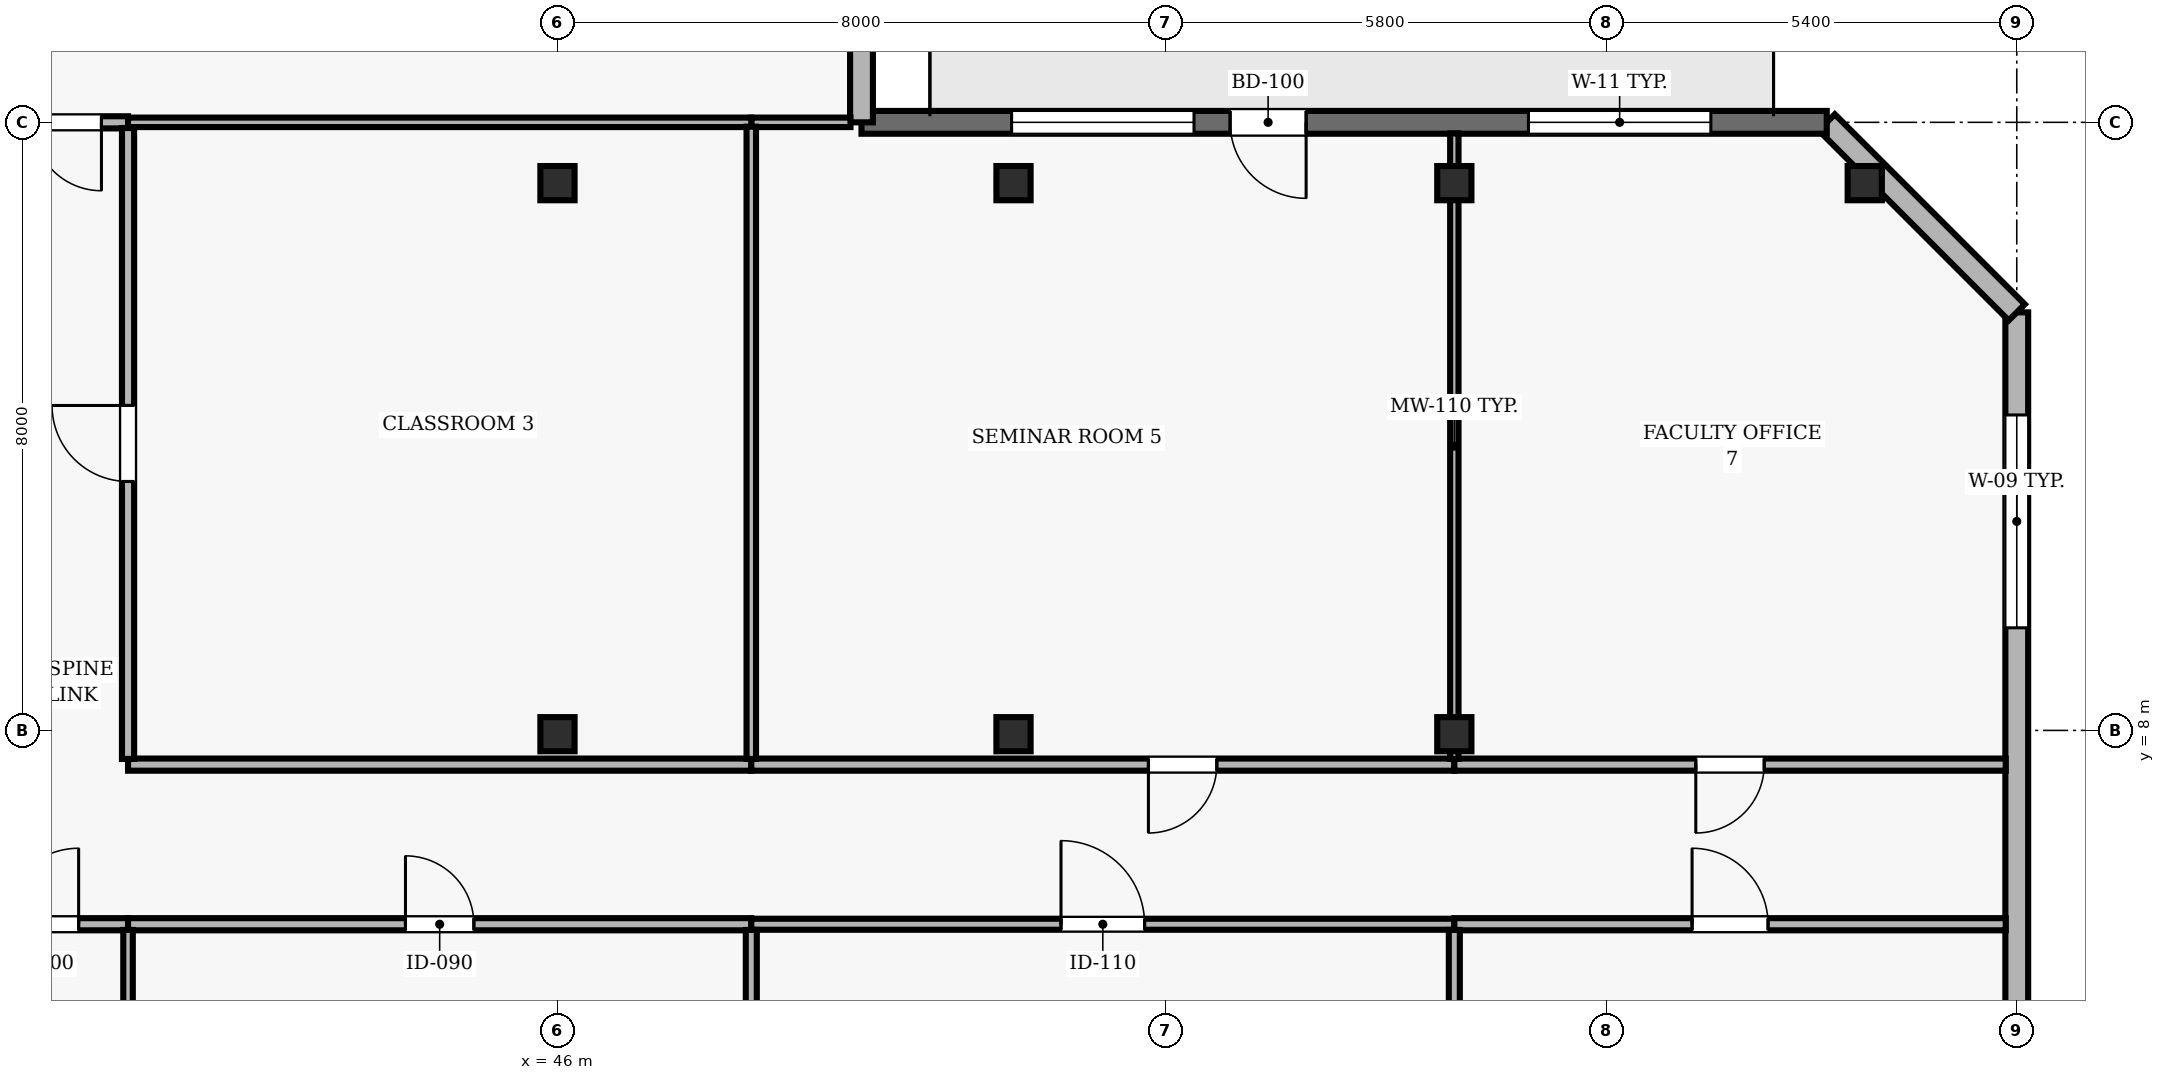
"""IFC4 building model, lengths in metres.
Left out: names, types, materials, properties, quantities, classifications, styles, units other than length and angle.
Written with IfcOpenShell. Run it as: python <this file> out.ifc"""

import sys

from ifc_helpers import new_model, si_unit, direction, frame, frame_2d, origin, origin_2d, place, context, subcontext, project, spatial, rectangle, hollow_rectangle, extrude, element, fill, save


model = new_model("IFC4")
c1 = context("Model", 3, precision=1e-05, world=origin(), true_north=direction((0.0, 1.0)))
c2 = subcontext(c1, "Body", "Model", "MODEL_VIEW")
j1 = project(units=[si_unit("LENGTHUNIT", "METRE"), si_unit("PLANEANGLEUNIT", "RADIAN")], contexts=[c1])
p1 = place(None, origin())
s1 = spatial("IfcSite", under=j1, at=p1, CompositionType="ELEMENT")
p2 = place(p1, origin())
s2 = spatial("IfcBuilding", under=s1, at=p2, CompositionType="ELEMENT")
p3 = place(p2, frame((0.0, 0.0, 175.8)))
s3 = spatial("IfcBuildingStorey", under=s2, at=p3, CompositionType="ELEMENT", Elevation=175.8)
for number, where, z_axis, x_axis in (
    (1, (46.0, 7.95, 0.0), (0.0, 0.0, 1.0), (1.0, 0.0, 0.0)),
    (2, (46.0, 15.2, 0.0), (0.0, 0.0, 1.0), (1.0, 0.0, 0.0)),
    (3, (52.0, 7.95, 0.0), (0.0, 0.0, 1.0), (1.0, 0.0, 0.0)),
    (4, (52.0, 15.2, 0.0), (0.0, 0.0, 1.0), (1.0, 0.0, 0.0)),
    (5, (57.8, 7.95, 0.0), (0.0, 0.0, 1.0), (1.0, 0.0, 0.0)),
    (6, (57.8, 15.2, 0.0), (0.0, 0.0, 1.0), (1.0, 0.0, 0.0)),
    (7, (63.2, 15.2, 0.0), (0.0, 0.0, 1.0), (1.0, 0.0, 0.0)),
):
    element("IfcColumn", number, at=place(p3, frame(where, z_axis=z_axis, x_axis=x_axis)), inside=s3, PredefinedType="COLUMN", context=c2, shape_type="SweptSolid", body=[
        extrude(hollow_rectangle(XDim=0.45, YDim=0.45, WallThickness=0.02, at=origin_2d()), origin(), (0.0, 0.0, 1.0), 3.9),
    ])
p4 = place(p3, frame((65.2, 2.5, 0.0), z_axis=(0.0, 0.0, 1.0), x_axis=(0.0, 1.0, 0.0)))
e8 = element("IfcWall", 8, at=p4, inside=s3, PredefinedType="SOLIDWALL", context=c2, shape_type="SweptSolid", body=[
    extrude(rectangle(XDim=11.0, YDim=0.3, at=frame_2d((5.5, 0.0))), origin(), (0.0, 0.0, 1.0), 3.69),
])
p5 = place(p4, frame((6.85, 0.0, 0.9)))
e9 = element("IfcOpeningElement", 9, at=p5, cuts=e8, PredefinedType="OPENING", context=c2, shape_type="SweptSolid", body=[
    extrude(rectangle(XDim=2.8, YDim=1.8, at=frame_2d((1.4, 0.9))), frame((0.0, 0.16, 0.0), z_axis=(0.0, -1.0, 0.0), x_axis=(1.0, 0.0, 0.0)), (0.0, 0.0, 1.0), 0.32),
])
p6 = place(p3, frame((65.2, 13.5, 0.0), z_axis=(0.0, 0.0, 1.0), x_axis=(-0.707106781187, 0.707106781187, 0.0)))
e10 = element("IfcWall", 10, at=p6, inside=s3, PredefinedType="SOLIDWALL", context=c2, shape_type="SweptSolid", body=[
    extrude(rectangle(XDim=3.536, YDim=0.3, at=frame_2d((1.768, 0.0))), origin(), (0.0, 0.0, 1.0), 3.69),
])
p7 = place(p3, frame((62.7, 16.0, 0.0), z_axis=(0.0, 0.0, 1.0), x_axis=(-1.0, 0.0, 0.0)))
e11 = element("IfcWall", 11, at=p7, inside=s3, PredefinedType="SOLIDWALL", context=c2, shape_type="SweptSolid", body=[
    extrude(rectangle(XDim=12.7, YDim=0.3, at=frame_2d((6.35, 0.0))), origin(), (0.0, 0.0, 1.0), 3.69),
])
p8 = place(p7, frame((6.85, 0.0, 0.0)))
e12 = element("IfcOpeningElement", 12, at=p8, cuts=e11, PredefinedType="OPENING", context=c2, shape_type="SweptSolid", body=[
    extrude(rectangle(XDim=1.0, YDim=2.2, at=frame_2d((0.5, 1.1))), frame((0.0, 0.16, 0.0), z_axis=(0.0, -1.0, 0.0), x_axis=(1.0, 0.0, 0.0)), (0.0, 0.0, 1.0), 0.32),
])
p9 = place(p7, frame((1.525, 0.0, 0.9)))
e13 = element("IfcOpeningElement", 13, at=p9, cuts=e11, PredefinedType="OPENING", context=c2, shape_type="SweptSolid", body=[
    extrude(rectangle(XDim=2.4, YDim=2.2, at=frame_2d((1.2, 1.1))), frame((0.0, 0.16, 0.0), z_axis=(0.0, -1.0, 0.0), x_axis=(1.0, 0.0, 0.0)), (0.0, 0.0, 1.0), 0.32),
])
p10 = place(p7, frame((8.325, 0.0, 0.9)))
e14 = element("IfcOpeningElement", 14, at=p10, cuts=e11, PredefinedType="OPENING", context=c2, shape_type="SweptSolid", body=[
    extrude(rectangle(XDim=2.4, YDim=2.2, at=frame_2d((1.2, 1.1))), frame((0.0, 0.16, 0.0), z_axis=(0.0, -1.0, 0.0), x_axis=(1.0, 0.0, 0.0)), (0.0, 0.0, 1.0), 0.32),
])
p11 = place(p3, frame((50.0, 16.0, 0.0), z_axis=(0.0, 0.0, 1.0), x_axis=(0.0, 1.0, 0.0)))
e15 = element("IfcWall", 15, at=p11, inside=s3, PredefinedType="SOLIDWALL", context=c2, shape_type="SweptSolid", body=[
    extrude(rectangle(XDim=7.44, YDim=0.3, at=frame_2d((3.72, 0.0))), origin(), (0.0, 0.0, 1.0), 3.69),
])
p12 = place(p11, frame((2.22, 0.0, 0.9)))
e16 = element("IfcOpeningElement", 16, at=p12, cuts=e15, PredefinedType="OPENING", context=c2, shape_type="SweptSolid", body=[
    extrude(rectangle(XDim=3.0, YDim=2.2, at=frame_2d((1.5, 1.1))), frame((0.0, 0.16, 0.0), z_axis=(0.0, -1.0, 0.0), x_axis=(1.0, 0.0, 0.0)), (0.0, 0.0, 1.0), 0.32),
])
p13 = place(p3, frame((38.05, 5.45, 0.0), z_axis=(0.0, 0.0, 1.0), x_axis=(1.0, 0.0, 0.0)))
e17 = element("IfcWall", 17, at=p13, inside=s3, PredefinedType="PARTITIONING", context=c2, shape_type="SweptSolid", body=[
    extrude(rectangle(XDim=2.3, YDim=0.16, at=frame_2d((1.15, 0.0))), origin(), (0.0, 0.0, 1.0), 3.343),
])
p14 = place(p13, frame((0.65, 0.0, 0.0)))
e18 = element("IfcOpeningElement", 18, at=p14, cuts=e17, PredefinedType="OPENING", context=c2, shape_type="SweptSolid", body=[
    extrude(rectangle(XDim=1.0, YDim=2.1, at=frame_2d((0.5, 1.05))), frame((0.0, 0.09, 0.0), z_axis=(0.0, -1.0, 0.0), x_axis=(1.0, 0.0, 0.0)), (0.0, 0.0, 1.0), 0.18),
])
p15 = place(p3, frame((40.35, 5.45, 0.0), z_axis=(0.0, 0.0, 1.0), x_axis=(1.0, 0.0, 0.0)))
e19 = element("IfcWall", 19, at=p15, inside=s3, PredefinedType="PARTITIONING", context=c2, shape_type="SweptSolid", body=[
    extrude(rectangle(XDim=8.2, YDim=0.16, at=frame_2d((4.1, 0.0))), origin(), (0.0, 0.0, 1.0), 3.343),
])
p16 = place(p15, frame((3.65, 0.0, 0.0)))
e20 = element("IfcOpeningElement", 20, at=p16, cuts=e19, PredefinedType="OPENING", context=c2, shape_type="SweptSolid", body=[
    extrude(rectangle(XDim=0.9, YDim=2.1, at=frame_2d((0.45, 1.05))), frame((0.0, 0.09, 0.0), z_axis=(0.0, -1.0, 0.0), x_axis=(1.0, 0.0, 0.0)), (0.0, 0.0, 1.0), 0.18),
])
p17 = place(p3, frame((40.35, 16.0, 0.0), z_axis=(0.0, 0.0, 1.0), x_axis=(-1.0, 0.0, 0.0)))
e21 = element("IfcWall", 21, at=p17, inside=s3, PredefinedType="PARTITIONING", context=c2, shape_type="SweptSolid", body=[
    extrude(rectangle(XDim=2.3, YDim=0.16, at=frame_2d((1.15, 0.0))), origin(), (0.0, 0.0, 1.0), 3.69),
])
p18 = place(p17, frame((0.35, 0.0, 0.0)))
e22 = element("IfcOpeningElement", 22, at=p18, cuts=e21, PredefinedType="OPENING", context=c2, shape_type="SweptSolid", body=[
    extrude(rectangle(XDim=0.9, YDim=2.1, at=frame_2d((0.45, 1.05))), frame((0.0, 0.09, 0.0), z_axis=(0.0, -1.0, 0.0), x_axis=(1.0, 0.0, 0.0)), (0.0, 0.0, 1.0), 0.18),
])
p19 = place(p3, frame((48.55, 5.45, 0.0), z_axis=(0.0, 0.0, 1.0), x_axis=(1.0, 0.0, 0.0)))
e23 = element("IfcWall", 23, at=p19, inside=s3, PredefinedType="PARTITIONING", context=c2, shape_type="SweptSolid", body=[
    extrude(rectangle(XDim=9.25, YDim=0.145, at=frame_2d((4.625, 0.0))), origin(), (0.0, 0.0, 1.0), 3.343),
])
p20 = place(p19, frame((4.075, 0.0, 0.0)))
e24 = element("IfcOpeningElement", 24, at=p20, cuts=e23, PredefinedType="OPENING", context=c2, shape_type="SweptSolid", body=[
    extrude(rectangle(XDim=1.1, YDim=2.15, at=frame_2d((0.55, 1.075))), frame((0.0, 0.083, 0.0), z_axis=(0.0, -1.0, 0.0), x_axis=(1.0, 0.0, 0.0)), (0.0, 0.0, 1.0), 0.165),
])
p21 = place(p3, frame((48.55, 7.55, 0.0), z_axis=(0.0, 0.0, 1.0), x_axis=(-1.0, 0.0, 0.0)))
e25 = element("IfcWall", 25, at=p21, inside=s3, PredefinedType="PARTITIONING", context=c2, shape_type="SweptSolid", body=[
    extrude(rectangle(XDim=8.2, YDim=0.16, at=frame_2d((4.1, 0.0))), origin(), (0.0, 0.0, 1.0), 3.139),
])
p22 = place(p3, frame((48.55, 16.0, 0.0), z_axis=(0.0, 0.0, 1.0), x_axis=(1.0, 0.0, 0.0)))
e26 = element("IfcWall", 26, at=p22, inside=s3, PredefinedType="PARTITIONING", context=c2, shape_type="SweptSolid", body=[
    extrude(rectangle(XDim=1.305, YDim=0.125, at=frame_2d((0.652, 0.0))), origin(), (0.0, 0.0, 1.0), 3.69),
])
p23 = place(p3, frame((48.55, 16.0, 0.0), z_axis=(0.0, 0.0, 1.0), x_axis=(-1.0, 0.0, 0.0)))
e27 = element("IfcWall", 27, at=p23, inside=s3, PredefinedType="PARTITIONING", context=c2, shape_type="SweptSolid", body=[
    extrude(rectangle(XDim=8.2, YDim=0.125, at=frame_2d((4.1, 0.0))), origin(), (0.0, 0.0, 1.0), 3.69),
])
p24 = place(p3, frame((57.8, 5.45, 0.0), z_axis=(0.0, 0.0, 1.0), x_axis=(1.0, 0.0, 0.0)))
e28 = element("IfcWall", 28, at=p24, inside=s3, PredefinedType="PARTITIONING", context=c2, shape_type="SweptSolid", body=[
    extrude(rectangle(XDim=7.255, YDim=0.16, at=frame_2d((3.627, 0.0))), origin(), (0.0, 0.0, 1.0), 3.69),
])
p25 = place(p24, frame((3.128, 0.0, 0.0)))
e29 = element("IfcOpeningElement", 29, at=p25, cuts=e28, PredefinedType="OPENING", context=c2, shape_type="SweptSolid", body=[
    extrude(rectangle(XDim=1.0, YDim=2.1, at=frame_2d((0.5, 1.05))), frame((0.0, 0.09, 0.0), z_axis=(0.0, -1.0, 0.0), x_axis=(1.0, 0.0, 0.0)), (0.0, 0.0, 1.0), 0.18),
])
p26 = place(p3, frame((57.8, 7.55, 0.0), z_axis=(0.0, 0.0, 1.0), x_axis=(-1.0, 0.0, 0.0)))
e30 = element("IfcWall", 30, at=p26, inside=s3, PredefinedType="PARTITIONING", context=c2, shape_type="SweptSolid", body=[
    extrude(rectangle(XDim=9.25, YDim=0.16, at=frame_2d((4.625, 0.0))), origin(), (0.0, 0.0, 1.0), 3.139),
])
p27 = place(p26, frame((3.125, 0.0, 0.0)))
e31 = element("IfcOpeningElement", 31, at=p27, cuts=e30, PredefinedType="OPENING", context=c2, shape_type="SweptSolid", body=[
    extrude(rectangle(XDim=0.9, YDim=2.1, at=frame_2d((0.45, 1.05))), frame((0.0, 0.09, 0.0), z_axis=(0.0, -1.0, 0.0), x_axis=(1.0, 0.0, 0.0)), (0.0, 0.0, 1.0), 0.18),
])
p28 = place(p3, frame((65.055, 7.55, 0.0), z_axis=(0.0, 0.0, 1.0), x_axis=(-1.0, 0.0, 0.0)))
e32 = element("IfcWall", 32, at=p28, inside=s3, PredefinedType="PARTITIONING", context=c2, shape_type="SweptSolid", body=[
    extrude(rectangle(XDim=7.255, YDim=0.16, at=frame_2d((3.627, 0.0))), origin(), (0.0, 0.0, 1.0), 3.69),
])
p29 = place(p28, frame((3.178, 0.0, 0.0)))
e33 = element("IfcOpeningElement", 33, at=p29, cuts=e32, PredefinedType="OPENING", context=c2, shape_type="SweptSolid", body=[
    extrude(rectangle(XDim=0.9, YDim=2.1, at=frame_2d((0.45, 1.05))), frame((0.0, 0.09, 0.0), z_axis=(0.0, -1.0, 0.0), x_axis=(1.0, 0.0, 0.0)), (0.0, 0.0, 1.0), 0.18),
])
p30 = place(p3, frame((40.35, 0.145, 0.0), z_axis=(0.0, 0.0, 1.0), x_axis=(0.0, 1.0, 0.0)))
e34 = element("IfcWall", 34, at=p30, inside=s3, PredefinedType="PARTITIONING", context=c2, shape_type="SweptSolid", body=[
    extrude(rectangle(XDim=5.23, YDim=0.125, at=frame_2d((2.615, 0.0))), origin(), (0.0, 0.0, 1.0), 3.69),
])
p31 = place(p3, frame((40.35, 7.625, 0.0), z_axis=(0.0, 0.0, 1.0), x_axis=(0.0, 1.0, 0.0)))
e35 = element("IfcWall", 35, at=p31, inside=s3, PredefinedType="PARTITIONING", context=c2, shape_type="SweptSolid", body=[
    extrude(rectangle(XDim=8.3, YDim=0.16, at=frame_2d((4.15, 0.0))), origin(), (0.0, 0.0, 1.0), 3.343),
])
p32 = place(p31, frame((3.65, 0.0, 0.0)))
e36 = element("IfcOpeningElement", 36, at=p32, cuts=e35, PredefinedType="OPENING", context=c2, shape_type="SweptSolid", body=[
    extrude(rectangle(XDim=1.0, YDim=2.1, at=frame_2d((0.5, 1.05))), frame((0.0, 0.09, 0.0), z_axis=(0.0, -1.0, 0.0), x_axis=(1.0, 0.0, 0.0)), (0.0, 0.0, 1.0), 0.18),
])
p33 = place(p3, frame((48.55, 0.145, 0.0), z_axis=(0.0, 0.0, 1.0), x_axis=(0.0, 1.0, 0.0)))
e37 = element("IfcWall", 37, at=p33, inside=s3, PredefinedType="PARTITIONING", context=c2, shape_type="SweptSolid", body=[
    extrude(rectangle(XDim=5.23, YDim=0.145, at=frame_2d((2.615, 0.0))), origin(), (0.0, 0.0, 1.0), 3.69),
])
p34 = place(p3, frame((48.55, 7.625, 0.0), z_axis=(0.0, 0.0, 1.0), x_axis=(0.0, 1.0, 0.0)))
e38 = element("IfcWall", 38, at=p34, inside=s3, PredefinedType="PARTITIONING", context=c2, shape_type="SweptSolid", body=[
    extrude(rectangle(XDim=8.318, YDim=0.125, at=frame_2d((4.159, 0.0))), origin(), (0.0, 0.0, 1.0), 3.69),
])
p35 = place(p3, frame((57.8, 0.145, 0.0), z_axis=(0.0, 0.0, 1.0), x_axis=(0.0, 1.0, 0.0)))
e39 = element("IfcWall", 39, at=p35, inside=s3, PredefinedType="PARTITIONING", context=c2, shape_type="SweptSolid", body=[
    extrude(rectangle(XDim=5.23, YDim=0.145, at=frame_2d((2.615, 0.0))), origin(), (0.0, 0.0, 1.0), 3.139),
])
p36 = place(p3, frame((57.8, 7.625, 0.0), z_axis=(0.0, 0.0, 1.0), x_axis=(0.0, 1.0, 0.0)))
e40 = element("IfcWall", 40, at=p36, inside=s3, PredefinedType="MOVABLE", context=c2, shape_type="SweptSolid", body=[
    extrude(rectangle(XDim=8.23, YDim=0.11, at=frame_2d((4.115, 0.0))), origin(), (0.0, 0.0, 1.0), 3.139),
])
p37 = place(p5, origin())
e41 = element("IfcWindow", 41, at=p37, inside=s3, PartitioningType="SINGLE_PANEL", PredefinedType="WINDOW", context=c2, shape_type="SweptSolid", body=[
    extrude(rectangle(XDim=2.8, YDim=1.8, at=frame_2d((1.4, 0.9))), frame((0.0, 0.03, 0.0), z_axis=(0.0, -1.0, 0.0), x_axis=(1.0, 0.0, 0.0)), (0.0, 0.0, 1.0), 0.06),
])
fill(e9, e41)
p38 = place(p8, origin())
e42 = element("IfcDoor", 42, at=p38, inside=s3, OperationType="SINGLE_SWING_LEFT", PredefinedType="DOOR", context=c2, shape_type="SweptSolid", body=[
    extrude(rectangle(XDim=1.0, YDim=2.2, at=frame_2d((0.5, 1.1))), frame((0.0, 0.025, 0.0), z_axis=(0.0, -1.0, 0.0), x_axis=(1.0, 0.0, 0.0)), (0.0, 0.0, 1.0), 0.05),
])
fill(e12, e42)
p39 = place(p9, origin())
e43 = element("IfcWindow", 43, at=p39, inside=s3, PartitioningType="SINGLE_PANEL", PredefinedType="WINDOW", context=c2, shape_type="SweptSolid", body=[
    extrude(rectangle(XDim=2.4, YDim=2.2, at=frame_2d((1.2, 1.1))), frame((0.0, 0.03, 0.0), z_axis=(0.0, -1.0, 0.0), x_axis=(1.0, 0.0, 0.0)), (0.0, 0.0, 1.0), 0.06),
])
fill(e13, e43)
p40 = place(p10, origin())
e44 = element("IfcWindow", 44, at=p40, inside=s3, PartitioningType="SINGLE_PANEL", PredefinedType="WINDOW", context=c2, shape_type="SweptSolid", body=[
    extrude(rectangle(XDim=2.4, YDim=2.2, at=frame_2d((1.2, 1.1))), frame((0.0, 0.03, 0.0), z_axis=(0.0, -1.0, 0.0), x_axis=(1.0, 0.0, 0.0)), (0.0, 0.0, 1.0), 0.06),
])
fill(e14, e44)
p41 = place(p14, origin())
e45 = element("IfcDoor", 45, at=p41, inside=s3, OperationType="SINGLE_SWING_RIGHT", PredefinedType="DOOR", context=c2, shape_type="SweptSolid", body=[
    extrude(rectangle(XDim=1.0, YDim=2.1, at=frame_2d((0.5, 1.05))), frame((0.0, 0.025, 0.0), z_axis=(0.0, -1.0, 0.0), x_axis=(1.0, 0.0, 0.0)), (0.0, 0.0, 1.0), 0.05),
])
fill(e18, e45)
p42 = place(p16, origin())
e46 = element("IfcDoor", 46, at=p42, inside=s3, OperationType="SINGLE_SWING_LEFT", PredefinedType="DOOR", context=c2, shape_type="SweptSolid", body=[
    extrude(rectangle(XDim=0.9, YDim=2.1, at=frame_2d((0.45, 1.05))), frame((0.0, 0.025, 0.0), z_axis=(0.0, -1.0, 0.0), x_axis=(1.0, 0.0, 0.0)), (0.0, 0.0, 1.0), 0.05),
])
fill(e20, e46)
p43 = place(p32, origin())
e47 = element("IfcDoor", 47, at=p43, inside=s3, OperationType="SINGLE_SWING_RIGHT", PredefinedType="DOOR", context=c2, shape_type="SweptSolid", body=[
    extrude(rectangle(XDim=1.0, YDim=2.1, at=frame_2d((0.5, 1.05))), frame((0.0, 0.025, 0.0), z_axis=(0.0, -1.0, 0.0), x_axis=(1.0, 0.0, 0.0)), (0.0, 0.0, 1.0), 0.05),
])
fill(e36, e47)
p44 = place(p20, origin())
e48 = element("IfcDoor", 48, at=p44, inside=s3, OperationType="SINGLE_SWING_LEFT", PredefinedType="DOOR", context=c2, shape_type="SweptSolid", body=[
    extrude(rectangle(XDim=1.1, YDim=2.15, at=frame_2d((0.55, 1.075))), frame((0.0, 0.025, 0.0), z_axis=(0.0, -1.0, 0.0), x_axis=(1.0, 0.0, 0.0)), (0.0, 0.0, 1.0), 0.05),
])
fill(e24, e48)
p45 = place(p27, origin())
e49 = element("IfcDoor", 49, at=p45, inside=s3, OperationType="SINGLE_SWING_RIGHT", PredefinedType="DOOR", context=c2, shape_type="SweptSolid", body=[
    extrude(rectangle(XDim=0.9, YDim=2.1, at=frame_2d((0.45, 1.05))), frame((0.0, 0.025, 0.0), z_axis=(0.0, -1.0, 0.0), x_axis=(1.0, 0.0, 0.0)), (0.0, 0.0, 1.0), 0.05),
])
fill(e31, e49)
p46 = place(p25, origin())
e50 = element("IfcDoor", 50, at=p46, inside=s3, OperationType="SINGLE_SWING_LEFT", PredefinedType="DOOR", context=c2, shape_type="SweptSolid", body=[
    extrude(rectangle(XDim=1.0, YDim=2.1, at=frame_2d((0.5, 1.05))), frame((0.0, 0.025, 0.0), z_axis=(0.0, -1.0, 0.0), x_axis=(1.0, 0.0, 0.0)), (0.0, 0.0, 1.0), 0.05),
])
fill(e29, e50)
p47 = place(p29, origin())
e51 = element("IfcDoor", 51, at=p47, inside=s3, OperationType="SINGLE_SWING_RIGHT", PredefinedType="DOOR", context=c2, shape_type="SweptSolid", body=[
    extrude(rectangle(XDim=0.9, YDim=2.1, at=frame_2d((0.45, 1.05))), frame((0.0, 0.025, 0.0), z_axis=(0.0, -1.0, 0.0), x_axis=(1.0, 0.0, 0.0)), (0.0, 0.0, 1.0), 0.05),
])
fill(e33, e51)
p48 = place(p18, origin())
e52 = element("IfcDoor", 52, at=p48, inside=s3, OperationType="SINGLE_SWING_LEFT", PredefinedType="DOOR", context=c2, shape_type="SweptSolid", body=[
    extrude(rectangle(XDim=0.9, YDim=2.1, at=frame_2d((0.45, 1.05))), frame((0.0, 0.025, 0.0), z_axis=(0.0, -1.0, 0.0), x_axis=(1.0, 0.0, 0.0)), (0.0, 0.0, 1.0), 0.05),
])
fill(e22, e52)
save(model, sys.argv[1])
